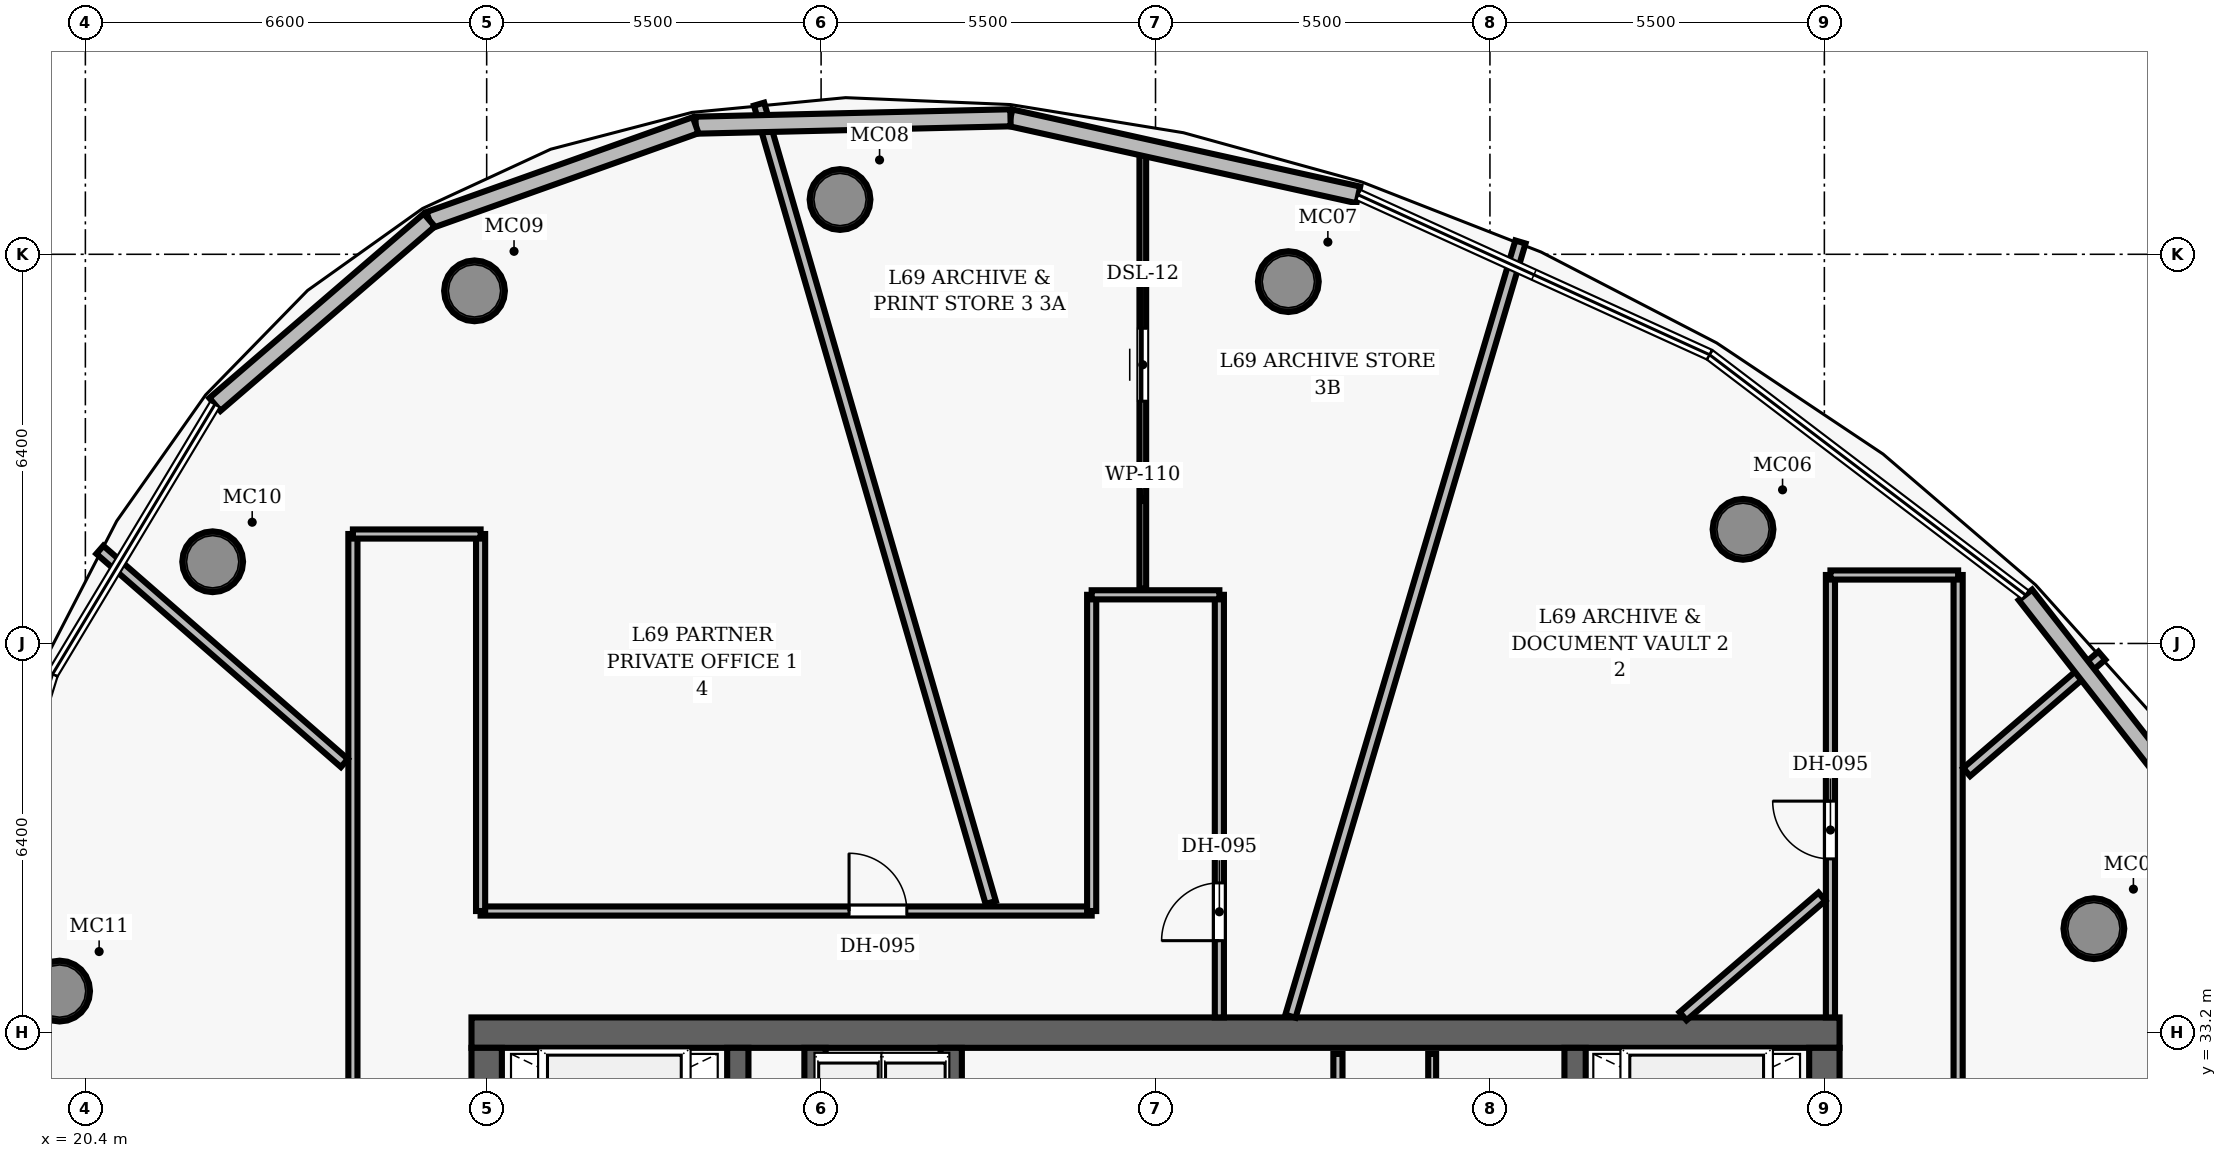
"""IFC4 building model, lengths in metres.
Left out: names, types, materials, properties, quantities, classifications, styles, units other than length and angle.
Written with IfcOpenShell. Run it as: python <this file> out.ifc"""

import sys

from ifc_helpers import new_model, si_unit, direction, frame, frame_2d, origin, origin_2d, place, context, subcontext, project, spatial, rectangle, hollow_circle, extrude, element, fill, save


model = new_model("IFC4")
c1 = context("Model", 3, precision=1e-05, world=origin(), true_north=direction((0.0, 1.0)))
c2 = subcontext(c1, "Body", "Model", "MODEL_VIEW")
j1 = project(units=[si_unit("LENGTHUNIT", "METRE"), si_unit("PLANEANGLEUNIT", "RADIAN")], contexts=[c1])
p1 = place(None, origin())
s1 = spatial("IfcSite", under=j1, at=p1, CompositionType="ELEMENT")
p2 = place(p1, origin())
s2 = spatial("IfcBuilding", under=s1, at=p2, CompositionType="ELEMENT")
p3 = place(p2, frame((0.0, 0.0, 272.85)))
s3 = spatial("IfcBuildingStorey", under=s2, at=p3, CompositionType="ELEMENT", Elevation=272.85)
p4 = place(p3, frame((26.75, 33.2, 0.0), z_axis=(0.0, 0.0, 1.0), x_axis=(1.0, 0.0, 0.0)))
e1 = element("IfcWall", 1, at=p4, inside=s3, PredefinedType="SHEAR", context=c2, shape_type="SweptSolid", body=[
    extrude(rectangle(XDim=22.5, YDim=0.5, at=frame_2d((11.25, 0.0))), origin(), (0.0, 0.0, 1.0), 3.85),
])
p5 = place(p3, frame((27.0, 19.05, 0.0), z_axis=(0.0, 0.0, 1.0), x_axis=(0.0, 1.0, 0.0)))
e2 = element("IfcWall", 2, at=p5, inside=s3, PredefinedType="SHEAR", context=c2, shape_type="SweptSolid", body=[
    extrude(rectangle(XDim=13.9, YDim=0.5, at=frame_2d((6.95, 0.0))), origin(), (0.0, 0.0, 1.0), 3.85),
])
p6 = place(p5, frame((8.2, 0.0, 0.0)))
e3 = element("IfcOpeningElement", 3, at=p6, cuts=e2, PredefinedType="OPENING", context=c2, shape_type="SweptSolid", body=[
    extrude(rectangle(XDim=1.05, YDim=2.15, at=frame_2d((0.525, 1.075))), frame((0.0, 0.26, 0.0), z_axis=(0.0, -1.0, 0.0), x_axis=(1.0, 0.0, 0.0)), (0.0, 0.0, 1.0), 0.52),
])
p7 = place(p3, frame((49.0, 19.05, 0.0), z_axis=(0.0, 0.0, 1.0), x_axis=(0.0, 1.0, 0.0)))
e4 = element("IfcWall", 4, at=p7, inside=s3, PredefinedType="SHEAR", context=c2, shape_type="SweptSolid", body=[
    extrude(rectangle(XDim=13.9, YDim=0.5, at=frame_2d((6.95, 0.0))), origin(), (0.0, 0.0, 1.0), 3.85),
])
p8 = place(p7, frame((8.2, 0.0, 0.0)))
e5 = element("IfcOpeningElement", 5, at=p8, cuts=e4, PredefinedType="OPENING", context=c2, shape_type="SweptSolid", body=[
    extrude(rectangle(XDim=1.05, YDim=2.15, at=frame_2d((0.525, 1.075))), frame((0.0, 0.26, 0.0), z_axis=(0.0, -1.0, 0.0), x_axis=(1.0, 0.0, 0.0)), (0.0, 0.0, 1.0), 0.52),
])
for number, where, z_axis, x_axis in (
    (6, (31.13, 19.05, 0.0), (0.0, 0.0, 1.0), (0.0, 1.0, 0.0)),
    (7, (44.9, 19.05, 0.0), (0.0, 0.0, 1.0), (0.0, 1.0, 0.0)),
):
    element("IfcWall", number, at=place(p3, frame(where, z_axis=z_axis, x_axis=x_axis)), inside=s3, PredefinedType="SHEAR", context=c2, shape_type="SweptSolid", body=[
        extrude(rectangle(XDim=13.9, YDim=0.35, at=frame_2d((6.95, 0.0))), origin(), (0.0, 0.0, 1.0), 3.85),
    ])
for number, where, z_axis, x_axis in (
    (8, (53.433, 34.91, 0.0), (0.0, 0.0, 1.0), (1.0, 0.0, 0.0)),
    (9, (47.662, 41.477, 0.0), (0.0, 0.0, 1.0), (1.0, 0.0, 0.0)),
    (10, (40.185, 45.551, 0.0), (0.0, 0.0, 1.0), (1.0, 0.0, 0.0)),
    (11, (32.812, 46.901, 0.0), (0.0, 0.0, 1.0), (1.0, 0.0, 0.0)),
    (12, (26.8, 45.399, 0.0), (0.0, 0.0, 1.0), (1.0, 0.0, 0.0)),
    (13, (22.494, 40.944, 0.0), (0.0, 0.0, 1.0), (1.0, 0.0, 0.0)),
    (14, (19.976, 33.884, 0.0), (0.0, 0.0, 1.0), (1.0, 0.0, 0.0)),
):
    element("IfcColumn", number, at=place(p3, frame(where, z_axis=z_axis, x_axis=x_axis)), inside=s3, PredefinedType="COLUMN", context=c2, shape_type="SweptSolid", body=[
        extrude(hollow_circle(Radius=0.5, WallThickness=0.045, at=origin_2d()), origin(), (0.0, 0.0, 1.0), 3.85),
    ])
p9 = place(p3, frame((34.64, 26.69, 0.0), z_axis=(0.0, 0.0, 1.0), x_axis=(0.0, 1.0, 0.0)))
e15 = element("IfcWall", 15, at=p9, inside=s3, PredefinedType="SHEAR", context=c2, shape_type="SweptSolid", body=[
    extrude(rectangle(XDim=6.26, YDim=0.35, at=frame_2d((3.13, 0.0))), origin(), (0.0, 0.0, 1.0), 3.85),
])
p10 = place(p9, frame((0.85, 0.0, 0.0)))
e16 = element("IfcOpeningElement", 16, at=p10, cuts=e15, PredefinedType="OPENING", context=c2, shape_type="SweptSolid", body=[
    extrude(rectangle(XDim=1.05, YDim=2.15, at=frame_2d((0.525, 1.075))), frame((0.0, 0.185, 0.0), z_axis=(0.0, -1.0, 0.0), x_axis=(1.0, 0.0, 0.0)), (0.0, 0.0, 1.0), 0.37),
])
p11 = place(p3, frame((32.4, 30.22, 0.0), z_axis=(0.0, 0.0, 1.0), x_axis=(0.0, 1.0, 0.0)))
e17 = element("IfcWall", 17, at=p11, inside=s3, PredefinedType="SHEAR", context=c2, shape_type="SweptSolid", body=[
    extrude(rectangle(XDim=2.73, YDim=0.35, at=frame_2d((1.365, 0.0))), origin(), (0.0, 0.0, 1.0), 3.04),
])
p12 = place(p3, frame((41.0, 28.95, 0.0), z_axis=(0.0, 0.0, 1.0), x_axis=(0.0, 1.0, 0.0)))
e18 = element("IfcWall", 18, at=p12, inside=s3, PredefinedType="PARTITIONING", context=c2, shape_type="SweptSolid", body=[
    extrude(rectangle(XDim=3.9, YDim=0.15, at=frame_2d((1.95, 0.0))), origin(), (0.0, 0.0, 1.0), 3.04),
])
p13 = place(p12, frame((0.7, 0.0, 0.0)))
e19 = element("IfcOpeningElement", 19, at=p13, cuts=e18, PredefinedType="OPENING", context=c2, shape_type="SweptSolid", body=[
    extrude(rectangle(XDim=0.85, YDim=2.1, at=frame_2d((0.425, 1.05))), frame((0.0, 0.085, 0.0), z_axis=(0.0, -1.0, 0.0), x_axis=(1.0, 0.0, 0.0)), (0.0, 0.0, 1.0), 0.17),
])
p14 = place(p3, frame((42.55, 28.1, 0.0), z_axis=(0.0, 0.0, 1.0), x_axis=(0.0, 1.0, 0.0)))
e20 = element("IfcWall", 20, at=p14, inside=s3, PredefinedType="PARTITIONING", context=c2, shape_type="SweptSolid", body=[
    extrude(rectangle(XDim=4.75, YDim=0.13, at=frame_2d((2.375, 0.0))), origin(), (0.0, 0.0, 1.0), 3.04),
])
p15 = place(p14, frame((0.55, 0.0, 0.0)))
e21 = element("IfcOpeningElement", 21, at=p15, cuts=e20, PredefinedType="OPENING", context=c2, shape_type="SweptSolid", body=[
    extrude(rectangle(XDim=0.85, YDim=2.1, at=frame_2d((0.425, 1.05))), frame((0.0, 0.075, 0.0), z_axis=(0.0, -1.0, 0.0), x_axis=(1.0, 0.0, 0.0)), (0.0, 0.0, 1.0), 0.15),
])
p16 = place(p14, frame((2.9, 0.0, 0.0)))
e22 = element("IfcOpeningElement", 22, at=p16, cuts=e20, PredefinedType="OPENING", context=c2, shape_type="SweptSolid", body=[
    extrude(rectangle(XDim=0.85, YDim=2.1, at=frame_2d((0.425, 1.05))), frame((0.0, 0.075, 0.0), z_axis=(0.0, -1.0, 0.0), x_axis=(1.0, 0.0, 0.0)), (0.0, 0.0, 1.0), 0.15),
])
p17 = place(p3, frame((26.9, 35.2, 0.0), z_axis=(0.0, 0.0, 1.0), x_axis=(1.0, 0.0, 0.0)))
e23 = element("IfcWall", 23, at=p17, inside=s3, PredefinedType="PARTITIONING", context=c2, shape_type="SweptSolid", body=[
    extrude(rectangle(XDim=10.05, YDim=0.15, at=frame_2d((5.025, 0.0))), origin(), (0.0, 0.0, 1.0), 3.04),
])
p18 = place(p17, frame((6.06, 0.0, 0.0)))
e24 = element("IfcOpeningElement", 24, at=p18, cuts=e23, PredefinedType="OPENING", context=c2, shape_type="SweptSolid", body=[
    extrude(rectangle(XDim=0.95, YDim=2.15, at=frame_2d((0.475, 1.075))), frame((0.0, 0.085, 0.0), z_axis=(0.0, -1.0, 0.0), x_axis=(1.0, 0.0, 0.0)), (0.0, 0.0, 1.0), 0.17),
])
p19 = place(p3, frame((24.8, 10.6, 0.0), z_axis=(0.0, 0.0, 1.0), x_axis=(0.0, 1.0, 0.0)))
e25 = element("IfcWall", 25, at=p19, inside=s3, PredefinedType="PARTITIONING", context=c2, shape_type="SweptSolid", body=[
    extrude(rectangle(XDim=30.8, YDim=0.15, at=frame_2d((15.4, 0.0))), origin(), (0.0, 0.0, 1.0), 3.04),
])
p20 = place(p19, frame((19.156, 0.0, 0.0)))
e26 = element("IfcOpeningElement", 26, at=p20, cuts=e25, PredefinedType="OPENING", context=c2, shape_type="SweptSolid", body=[
    extrude(rectangle(XDim=0.95, YDim=2.15, at=frame_2d((0.475, 1.075))), frame((0.0, 0.085, 0.0), z_axis=(0.0, -1.0, 0.0), x_axis=(1.0, 0.0, 0.0)), (0.0, 0.0, 1.0), 0.17),
])
p21 = place(p19, frame((15.034, 0.0, 0.0)))
e27 = element("IfcOpeningElement", 27, at=p21, cuts=e25, PredefinedType="OPENING", context=c2, shape_type="SweptSolid", body=[
    extrude(rectangle(XDim=0.95, YDim=2.15, at=frame_2d((0.475, 1.075))), frame((0.0, 0.085, 0.0), z_axis=(0.0, -1.0, 0.0), x_axis=(1.0, 0.0, 0.0)), (0.0, 0.0, 1.0), 0.17),
])
p22 = place(p19, frame((1.941, 0.0, 0.0)))
e28 = element("IfcOpeningElement", 28, at=p22, cuts=e25, PredefinedType="OPENING", context=c2, shape_type="SweptSolid", body=[
    extrude(rectangle(XDim=0.95, YDim=2.15, at=frame_2d((0.475, 1.075))), frame((0.0, 0.085, 0.0), z_axis=(0.0, -1.0, 0.0), x_axis=(1.0, 0.0, 0.0)), (0.0, 0.0, 1.0), 0.17),
])
p23 = place(p3, frame((26.9, 35.2, 0.0), z_axis=(0.0, 0.0, 1.0), x_axis=(0.0, 1.0, 0.0)))
e29 = element("IfcWall", 29, at=p23, inside=s3, PredefinedType="PARTITIONING", context=c2, shape_type="SweptSolid", body=[
    extrude(rectangle(XDim=6.2, YDim=0.15, at=frame_2d((3.1, 0.0))), origin(), (0.0, 0.0, 1.0), 3.04),
])
p24 = place(p3, frame((24.8, 41.4, 0.0), z_axis=(0.0, 0.0, 1.0), x_axis=(1.0, 0.0, 0.0)))
e30 = element("IfcWall", 30, at=p24, inside=s3, PredefinedType="PARTITIONING", context=c2, shape_type="SweptSolid", body=[
    extrude(rectangle(XDim=2.1, YDim=0.15, at=frame_2d((1.05, 0.0))), origin(), (0.0, 0.0, 1.0), 3.04),
])
p25 = place(p3, frame((51.2, 10.6, 0.0), z_axis=(0.0, 0.0, 1.0), x_axis=(0.0, 1.0, 0.0)))
e31 = element("IfcWall", 31, at=p25, inside=s3, PredefinedType="PARTITIONING", context=c2, shape_type="SweptSolid", body=[
    extrude(rectangle(XDim=30.126, YDim=0.15, at=frame_2d((15.063, 0.0))), origin(), (0.0, 0.0, 1.0), 3.04),
])
p26 = place(p25, frame((19.053, 0.0, 0.0)))
e32 = element("IfcOpeningElement", 32, at=p26, cuts=e31, PredefinedType="OPENING", context=c2, shape_type="SweptSolid", body=[
    extrude(rectangle(XDim=0.95, YDim=2.15, at=frame_2d((0.475, 1.075))), frame((0.0, 0.085, 0.0), z_axis=(0.0, -1.0, 0.0), x_axis=(1.0, 0.0, 0.0)), (0.0, 0.0, 1.0), 0.17),
])
p27 = place(p25, frame((11.504, 0.0, 0.0)))
e33 = element("IfcOpeningElement", 33, at=p27, cuts=e31, PredefinedType="OPENING", context=c2, shape_type="SweptSolid", body=[
    extrude(rectangle(XDim=0.95, YDim=2.15, at=frame_2d((0.475, 1.075))), frame((0.0, 0.085, 0.0), z_axis=(0.0, -1.0, 0.0), x_axis=(1.0, 0.0, 0.0)), (0.0, 0.0, 1.0), 0.17),
])
p28 = place(p3, frame((49.1, 33.45, 0.0), z_axis=(0.0, 0.0, 1.0), x_axis=(0.0, 1.0, 0.0)))
e34 = element("IfcWall", 34, at=p28, inside=s3, PredefinedType="PARTITIONING", context=c2, shape_type="SweptSolid", body=[
    extrude(rectangle(XDim=7.276, YDim=0.15, at=frame_2d((3.638, 0.0))), origin(), (0.0, 0.0, 1.0), 3.04),
])
p29 = place(p28, frame((2.607, 0.0, 0.0)))
e35 = element("IfcOpeningElement", 35, at=p29, cuts=e34, PredefinedType="OPENING", context=c2, shape_type="SweptSolid", body=[
    extrude(rectangle(XDim=0.95, YDim=2.15, at=frame_2d((0.475, 1.075))), frame((0.0, 0.085, 0.0), z_axis=(0.0, -1.0, 0.0), x_axis=(1.0, 0.0, 0.0)), (0.0, 0.0, 1.0), 0.17),
])
p30 = place(p3, frame((49.1, 40.726, 0.0), z_axis=(0.0, 0.0, 1.0), x_axis=(1.0, 0.0, 0.0)))
e36 = element("IfcWall", 36, at=p30, inside=s3, PredefinedType="PARTITIONING", context=c2, shape_type="SweptSolid", body=[
    extrude(rectangle(XDim=2.1, YDim=0.15, at=frame_2d((1.05, 0.0))), origin(), (0.0, 0.0, 1.0), 3.04),
])
p31 = place(p3, frame((36.95, 35.2, 0.0), z_axis=(0.0, 0.0, 1.0), x_axis=(0.0, 1.0, 0.0)))
e37 = element("IfcWall", 37, at=p31, inside=s3, PredefinedType="PARTITIONING", context=c2, shape_type="SweptSolid", body=[
    extrude(rectangle(XDim=5.2, YDim=0.15, at=frame_2d((2.6, 0.0))), origin(), (0.0, 0.0, 1.0), 3.04),
])
p32 = place(p3, frame((39.05, 33.45, 0.0), z_axis=(0.0, 0.0, 1.0), x_axis=(0.0, 1.0, 0.0)))
e38 = element("IfcWall", 38, at=p32, inside=s3, PredefinedType="PARTITIONING", context=c2, shape_type="SweptSolid", body=[
    extrude(rectangle(XDim=6.95, YDim=0.15, at=frame_2d((3.475, 0.0))), origin(), (0.0, 0.0, 1.0), 3.04),
])
p33 = place(p32, frame((1.262, 0.0, 0.0)))
e39 = element("IfcOpeningElement", 39, at=p33, cuts=e38, PredefinedType="OPENING", context=c2, shape_type="SweptSolid", body=[
    extrude(rectangle(XDim=0.95, YDim=2.15, at=frame_2d((0.475, 1.075))), frame((0.0, 0.085, 0.0), z_axis=(0.0, -1.0, 0.0), x_axis=(1.0, 0.0, 0.0)), (0.0, 0.0, 1.0), 0.17),
])
p34 = place(p3, frame((36.95, 40.4, 0.0), z_axis=(0.0, 0.0, 1.0), x_axis=(1.0, 0.0, 0.0)))
e40 = element("IfcWall", 40, at=p34, inside=s3, PredefinedType="PARTITIONING", context=c2, shape_type="SweptSolid", body=[
    extrude(rectangle(XDim=2.1, YDim=0.15, at=frame_2d((1.05, 0.0))), origin(), (0.0, 0.0, 1.0), 3.04),
])
p35 = place(p3, frame((46.676, 33.47, 0.0), z_axis=(0.0, 0.0, 1.0), x_axis=(0.757802183171, 0.652484368534, 0.0)))
e41 = element("IfcWall", 41, at=p35, inside=s3, PredefinedType="PARTITIONING", context=c2, shape_type="SweptSolid", body=[
    extrude(rectangle(XDim=3.014, YDim=0.175, at=frame_2d((1.507, 0.0))), origin(), (0.0, 0.0, 1.0), 3.04),
])
p36 = place(p3, frame((51.34, 37.485, 0.0), z_axis=(0.0, 0.0, 1.0), x_axis=(0.757856805594, 0.652420924109, 0.0)))
e42 = element("IfcWall", 42, at=p36, inside=s3, PredefinedType="PARTITIONING", context=c2, shape_type="SweptSolid", body=[
    extrude(rectangle(XDim=2.934, YDim=0.175, at=frame_2d((1.467, 0.0))), origin(), (0.0, 0.0, 1.0), 3.04),
])
p37 = place(p3, frame((40.219, 33.47, 0.0), z_axis=(0.0, 0.0, 1.0), x_axis=(0.284773538312, 0.958594821537, 0.0)))
e43 = element("IfcWall", 43, at=p37, inside=s3, PredefinedType="PARTITIONING", context=c2, shape_type="SweptSolid", body=[
    extrude(rectangle(XDim=13.282, YDim=0.175, at=frame_2d((6.641, 0.0))), origin(), (0.0, 0.0, 1.0), 3.04),
])
p38 = place(p3, frame((35.29, 35.34, 0.0), z_axis=(0.0, 0.0, 1.0), x_axis=(-0.278700213972, 0.960378149862, 0.0)))
e44 = element("IfcWall", 44, at=p38, inside=s3, PredefinedType="PARTITIONING", context=c2, shape_type="SweptSolid", body=[
    extrude(rectangle(XDim=13.671, YDim=0.175, at=frame_2d((6.835, 0.0))), origin(), (0.0, 0.0, 1.0), 3.04),
])
p39 = place(p3, frame((24.66, 37.634, 0.0), z_axis=(0.0, 0.0, 1.0), x_axis=(-0.753664051115, 0.657259840594, 0.0)))
e45 = element("IfcWall", 45, at=p39, inside=s3, PredefinedType="PARTITIONING", context=c2, shape_type="SweptSolid", body=[
    extrude(rectangle(XDim=5.336, YDim=0.175, at=frame_2d((2.668, 0.0))), origin(), (0.0, 0.0, 1.0), 3.04),
])
p40 = place(p3, frame((37.791, 40.5, 0.0), z_axis=(0.0, 0.0, 1.0), x_axis=(0.0, 1.0, 0.0)))
e46 = element("IfcWall", 46, at=p40, inside=s3, PredefinedType="PARTITIONING", context=c2, shape_type="SweptSolid", body=[
    extrude(rectangle(XDim=7.368, YDim=0.11, at=frame_2d((3.684, 0.0))), origin(), (0.0, 0.0, 1.0), 3.04),
])
p41 = place(p40, frame((3.084, 0.0, 0.0)))
e47 = element("IfcOpeningElement", 47, at=p41, cuts=e46, PredefinedType="OPENING", context=c2, shape_type="SweptSolid", body=[
    extrude(rectangle(XDim=1.2, YDim=2.15, at=frame_2d((0.6, 1.075))), frame((0.0, 0.065, 0.0), z_axis=(0.0, -1.0, 0.0), x_axis=(1.0, 0.0, 0.0)), (0.0, 0.0, 1.0), 0.13),
])
p42 = place(p3, frame((52.307, 40.399, 0.0), z_axis=(0.0, 0.0, 1.0), x_axis=(0.616072222738, -0.787689670092, 0.0)))
e48 = element("IfcWall", 48, at=p42, inside=s3, PredefinedType="SOLIDWALL", context=c2, shape_type="SweptSolid", body=[
    extrude(rectangle(XDim=6.527, YDim=0.28, at=frame_2d((3.263, 0.0))), origin(), (0.0, 0.0, 1.0), 3.625),
])
p43 = place(p3, frame((35.615, 48.245, 0.0), z_axis=(0.0, 0.0, 1.0), x_axis=(0.976315307178, -0.216352538627, 0.0)))
e49 = element("IfcWall", 49, at=p43, inside=s3, PredefinedType="SOLIDWALL", context=c2, shape_type="SweptSolid", body=[
    extrude(rectangle(XDim=5.86, YDim=0.28, at=frame_2d((2.93, 0.0))), origin(), (0.0, 0.0, 1.0), 3.625),
])
p44 = place(p3, frame((30.437, 48.123, 0.0), z_axis=(0.0, 0.0, 1.0), x_axis=(0.9997244447, 0.023474127656, 0.0)))
e50 = element("IfcWall", 50, at=p44, inside=s3, PredefinedType="SOLIDWALL", context=c2, shape_type="SweptSolid", body=[
    extrude(rectangle(XDim=5.179, YDim=0.28, at=frame_2d((2.59, 0.0))), origin(), (0.0, 0.0, 1.0), 3.625),
])
p45 = place(p3, frame((26.056, 46.563, 0.0), z_axis=(0.0, 0.0, 1.0), x_axis=(0.942033742656, 0.335518148089, 0.0)))
e51 = element("IfcWall", 51, at=p45, inside=s3, PredefinedType="SOLIDWALL", context=c2, shape_type="SweptSolid", body=[
    extrude(rectangle(XDim=4.65, YDim=0.28, at=frame_2d((2.325, 0.0))), origin(), (0.0, 0.0, 1.0), 3.625),
])
p46 = place(p3, frame((22.53, 43.531, 0.0), z_axis=(0.0, 0.0, 1.0), x_axis=(0.758184677276, 0.652039872357, 0.0)))
e52 = element("IfcWall", 52, at=p46, inside=s3, PredefinedType="SOLIDWALL", context=c2, shape_type="SweptSolid", body=[
    extrude(rectangle(XDim=4.651, YDim=0.28, at=frame_2d((2.325, 0.0))), origin(), (0.0, 0.0, 1.0), 3.625),
])
p47 = place(p29, origin())
e53 = element("IfcDoor", 53, at=p47, inside=s3, OperationType="SINGLE_SWING_RIGHT", PredefinedType="DOOR", context=c2, shape_type="SweptSolid", body=[
    extrude(rectangle(XDim=0.95, YDim=2.15, at=frame_2d((0.475, 1.075))), frame((0.0, 0.025, 0.0), z_axis=(0.0, -1.0, 0.0), x_axis=(1.0, 0.0, 0.0)), (0.0, 0.0, 1.0), 0.05),
])
fill(e35, e53)
p48 = place(p33, origin())
e54 = element("IfcDoor", 54, at=p48, inside=s3, OperationType="SINGLE_SWING_LEFT", PredefinedType="DOOR", context=c2, shape_type="SweptSolid", body=[
    extrude(rectangle(XDim=0.95, YDim=2.15, at=frame_2d((0.475, 1.075))), frame((0.0, 0.025, 0.0), z_axis=(0.0, -1.0, 0.0), x_axis=(1.0, 0.0, 0.0)), (0.0, 0.0, 1.0), 0.05),
])
fill(e39, e54)
p49 = place(p41, origin())
e55 = element("IfcDoor", 55, at=p49, inside=s3, OperationType="SLIDING_TO_RIGHT", PredefinedType="DOOR", context=c2, shape_type="SweptSolid", body=[
    extrude(rectangle(XDim=1.2, YDim=2.15, at=frame_2d((0.6, 1.075))), frame((0.0, 0.025, 0.0), z_axis=(0.0, -1.0, 0.0), x_axis=(1.0, 0.0, 0.0)), (0.0, 0.0, 1.0), 0.05),
])
fill(e47, e55)
p50 = place(p18, origin())
e56 = element("IfcDoor", 56, at=p50, inside=s3, OperationType="SINGLE_SWING_LEFT", PredefinedType="DOOR", context=c2, shape_type="SweptSolid", body=[
    extrude(rectangle(XDim=0.95, YDim=2.15, at=frame_2d((0.475, 1.075))), frame((0.0, 0.025, 0.0), z_axis=(0.0, -1.0, 0.0), x_axis=(1.0, 0.0, 0.0)), (0.0, 0.0, 1.0), 0.05),
])
fill(e24, e56)
save(model, sys.argv[1])
